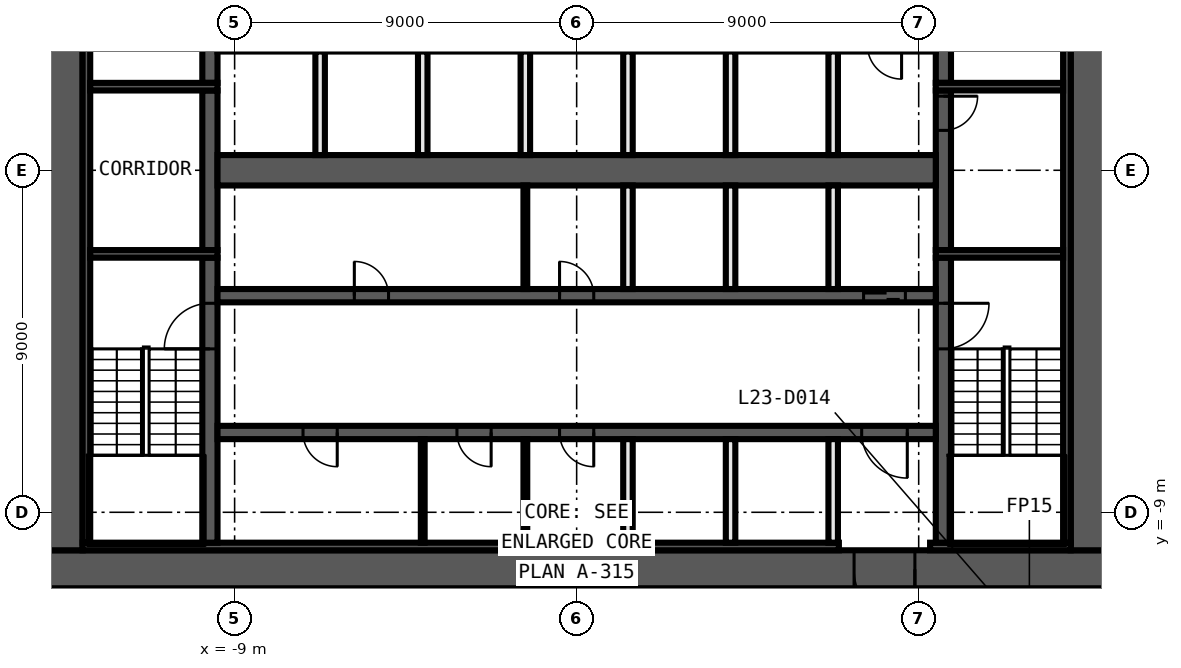
"""IFC4 building model, lengths in metres.
Left out: names, types, materials, properties, quantities, classifications, styles, units other than length and angle.
Written with IfcOpenShell. Run it as: python <this file> out.ifc"""

import sys

from ifc_helpers import new_model, si_unit, direction, frame, frame_2d, origin, place, context, subcontext, project, spatial, rectangle, extrude, element, fill, save


model = new_model("IFC4")
c1 = context("Model", 3, precision=1e-05, world=origin(), true_north=direction((0.0, 1.0)))
c2 = subcontext(c1, "Body", "Model", "MODEL_VIEW")
j1 = project(units=[si_unit("LENGTHUNIT", "METRE"), si_unit("PLANEANGLEUNIT", "RADIAN")], contexts=[c1])
p1 = place(None, origin())
s1 = spatial("IfcSite", under=j1, at=p1, CompositionType="ELEMENT")
p2 = place(p1, origin())
s2 = spatial("IfcBuilding", under=s1, at=p2, CompositionType="ELEMENT")
p3 = place(p2, frame((0.0, 0.0, 110.0)))
s3 = spatial("IfcBuildingStorey", under=s2, at=p3, CompositionType="ELEMENT", Elevation=110.0)
p4 = place(p3, frame((14.0, -10.5, 0.0), z_axis=(0.0, 0.0, 1.0), x_axis=(-1.0, 0.0, 0.0)))
e1 = element("IfcWall", 1, at=p4, inside=s3, PredefinedType="SHEAR", context=c2, shape_type="SweptSolid", body=[
    extrude(rectangle(XDim=28.0, YDim=1.0, at=frame_2d((14.0, 0.0))), origin(), (0.0, 0.0, 1.0), 3.3),
])
p5 = place(p4, frame((5.1, 0.0, 0.0)))
e2 = element("IfcOpeningElement", 2, at=p5, cuts=e1, PredefinedType="OPENING", context=c2, shape_type="SweptSolid", body=[
    extrude(rectangle(XDim=1.6, YDim=2.1, at=frame_2d((0.8, 1.05))), frame((0.0, 0.51, 0.0), z_axis=(0.0, -1.0, 0.0), x_axis=(1.0, 0.0, 0.0)), (0.0, 0.0, 1.0), 1.02),
])
for number, where, z_axis, x_axis in (
    (3, (13.5, 10.0, 0.0), (0.0, 0.0, 1.0), (0.0, -1.0, 0.0)),
    (4, (-13.5, -10.0, 0.0), (0.0, 0.0, 1.0), (0.0, 1.0, 0.0)),
):
    element("IfcWall", number, at=place(p3, frame(where, z_axis=z_axis, x_axis=x_axis)), inside=s3, PredefinedType="SHEAR", context=c2, shape_type="SweptSolid", body=[
        extrude(rectangle(XDim=20.0, YDim=1.0, at=frame_2d((10.0, 0.0))), origin(), (0.0, 0.0, 1.0), 3.3),
    ])
p6 = place(p3, frame((13.0, -9.9, 0.0), z_axis=(0.0, 0.0, 1.0), x_axis=(-1.0, 0.0, 0.0)))
e5 = element("IfcWall", 5, at=p6, inside=s3, PredefinedType="SHEAR", context=c2, shape_type="SweptSolid", body=[
    extrude(rectangle(XDim=3.7, YDim=0.2, at=frame_2d((1.85, 0.0))), origin(), (0.0, 0.0, 1.0), 3.3),
])
p7 = place(p3, frame((6.9, -9.9, 0.0), z_axis=(0.0, 0.0, 1.0), x_axis=(-1.0, 0.0, 0.0)))
e6 = element("IfcWall", 6, at=p7, inside=s3, PredefinedType="SHEAR", context=c2, shape_type="SweptSolid", body=[
    extrude(rectangle(XDim=19.9, YDim=0.2, at=frame_2d((9.95, 0.0))), origin(), (0.0, 0.0, 1.0), 3.3),
])
for number, where, z_axis, x_axis in (
    (7, (12.9, 9.8, 0.0), (0.0, 0.0, 1.0), (0.0, -1.0, 0.0)),
    (8, (-12.9, -9.8, 0.0), (0.0, 0.0, 1.0), (0.0, 1.0, 0.0)),
):
    element("IfcWall", number, at=place(p3, frame(where, z_axis=z_axis, x_axis=x_axis)), inside=s3, PredefinedType="SHEAR", context=c2, shape_type="SweptSolid", body=[
        extrude(rectangle(XDim=19.6, YDim=0.2, at=frame_2d((9.8, 0.0))), origin(), (0.0, 0.0, 1.0), 3.3),
    ])
p8 = place(p3, frame((9.65, -2.3, 0.0), z_axis=(0.0, 0.0, 1.0), x_axis=(0.0, -1.0, 0.0)))
e9 = element("IfcWall", 9, at=p8, inside=s3, PredefinedType="SHEAR", context=c2, shape_type="SweptSolid", body=[
    extrude(rectangle(XDim=7.5, YDim=0.4, at=frame_2d((3.75, 0.0))), origin(), (0.0, 0.0, 1.0), 3.3),
])
p9 = place(p8, frame((1.2, 0.0, 0.0)))
e10 = element("IfcOpeningElement", 10, at=p9, cuts=e9, PredefinedType="OPENING", context=c2, shape_type="SweptSolid", body=[
    extrude(rectangle(XDim=1.2, YDim=2.1, at=frame_2d((0.6, 1.05))), frame((0.0, 0.21, 0.0), z_axis=(0.0, -1.0, 0.0), x_axis=(1.0, 0.0, 0.0)), (0.0, 0.0, 1.0), 0.42),
])
p10 = place(p3, frame((9.65, 2.1, 0.0), z_axis=(0.0, 0.0, 1.0), x_axis=(0.0, -1.0, 0.0)))
e11 = element("IfcWall", 11, at=p10, inside=s3, PredefinedType="SHEAR", context=c2, shape_type="SweptSolid", body=[
    extrude(rectangle(XDim=4.2, YDim=0.4, at=frame_2d((2.1, 0.0))), origin(), (0.0, 0.0, 1.0), 3.3),
])
p11 = place(p10, frame((0.15, 0.0, 0.0)))
e12 = element("IfcOpeningElement", 12, at=p11, cuts=e11, PredefinedType="OPENING", context=c2, shape_type="SweptSolid", body=[
    extrude(rectangle(XDim=0.9, YDim=2.1, at=frame_2d((0.45, 1.05))), frame((0.0, 0.21, 0.0), z_axis=(0.0, -1.0, 0.0), x_axis=(1.0, 0.0, 0.0)), (0.0, 0.0, 1.0), 0.42),
])
p12 = place(p3, frame((9.65, 9.8, 0.0), z_axis=(0.0, 0.0, 1.0), x_axis=(0.0, -1.0, 0.0)))
e13 = element("IfcWall", 13, at=p12, inside=s3, PredefinedType="SHEAR", context=c2, shape_type="SweptSolid", body=[
    extrude(rectangle(XDim=7.5, YDim=0.4, at=frame_2d((3.75, 0.0))), origin(), (0.0, 0.0, 1.0), 3.3),
])
p13 = place(p12, frame((5.1, 0.0, 0.0)))
e14 = element("IfcOpeningElement", 14, at=p13, cuts=e13, PredefinedType="OPENING", context=c2, shape_type="SweptSolid", body=[
    extrude(rectangle(XDim=1.2, YDim=2.1, at=frame_2d((0.6, 1.05))), frame((0.0, 0.21, 0.0), z_axis=(0.0, -1.0, 0.0), x_axis=(1.0, 0.0, 0.0)), (0.0, 0.0, 1.0), 0.42),
])
p14 = place(p3, frame((-9.65, -9.8, 0.0), z_axis=(0.0, 0.0, 1.0), x_axis=(0.0, 1.0, 0.0)))
e15 = element("IfcWall", 15, at=p14, inside=s3, PredefinedType="SHEAR", context=c2, shape_type="SweptSolid", body=[
    extrude(rectangle(XDim=7.5, YDim=0.4, at=frame_2d((3.75, 0.0))), origin(), (0.0, 0.0, 1.0), 3.3),
])
p15 = place(p14, frame((5.1, 0.0, 0.0)))
e16 = element("IfcOpeningElement", 16, at=p15, cuts=e15, PredefinedType="OPENING", context=c2, shape_type="SweptSolid", body=[
    extrude(rectangle(XDim=1.2, YDim=2.1, at=frame_2d((0.6, 1.05))), frame((0.0, 0.21, 0.0), z_axis=(0.0, -1.0, 0.0), x_axis=(1.0, 0.0, 0.0)), (0.0, 0.0, 1.0), 0.42),
])
p16 = place(p3, frame((-9.65, -2.1, 0.0), z_axis=(0.0, 0.0, 1.0), x_axis=(0.0, 1.0, 0.0)))
e17 = element("IfcWall", 17, at=p16, inside=s3, PredefinedType="SHEAR", context=c2, shape_type="SweptSolid", body=[
    extrude(rectangle(XDim=4.2, YDim=0.4, at=frame_2d((2.1, 0.0))), origin(), (0.0, 0.0, 1.0), 3.3),
])
p17 = place(p3, frame((-9.65, 2.3, 0.0), z_axis=(0.0, 0.0, 1.0), x_axis=(0.0, 1.0, 0.0)))
e18 = element("IfcWall", 18, at=p17, inside=s3, PredefinedType="SHEAR", context=c2, shape_type="SweptSolid", body=[
    extrude(rectangle(XDim=7.5, YDim=0.4, at=frame_2d((3.75, 0.0))), origin(), (0.0, 0.0, 1.0), 3.3),
])
p18 = place(p17, frame((1.2, 0.0, 0.0)))
e19 = element("IfcOpeningElement", 19, at=p18, cuts=e18, PredefinedType="OPENING", context=c2, shape_type="SweptSolid", body=[
    extrude(rectangle(XDim=1.2, YDim=2.1, at=frame_2d((0.6, 1.05))), frame((0.0, 0.21, 0.0), z_axis=(0.0, -1.0, 0.0), x_axis=(1.0, 0.0, 0.0)), (0.0, 0.0, 1.0), 0.42),
])
for number, where, z_axis, x_axis in (
    (20, (9.45, 2.2, 0.0), (0.0, 0.0, 1.0), (1.0, 0.0, 0.0)),
    (21, (-9.45, 2.2, 0.0), (0.0, 0.0, 1.0), (-1.0, 0.0, 0.0)),
    (22, (9.45, -2.2, 0.0), (0.0, 0.0, 1.0), (1.0, 0.0, 0.0)),
    (23, (-9.45, -2.2, 0.0), (0.0, 0.0, 1.0), (-1.0, 0.0, 0.0)),
):
    element("IfcWall", number, at=place(p3, frame(where, z_axis=z_axis, x_axis=x_axis)), inside=s3, PredefinedType="SHEAR", context=c2, shape_type="SweptSolid", body=[
        extrude(rectangle(XDim=3.35, YDim=0.2, at=frame_2d((1.675, 0.0))), origin(), (0.0, 0.0, 1.0), 3.3),
    ])
p19 = place(p3, frame((-9.45, -3.3, 0.0), z_axis=(0.0, 0.0, 1.0), x_axis=(1.0, 0.0, 0.0)))
e24 = element("IfcWall", 24, at=p19, inside=s3, PredefinedType="SHEAR", context=c2, shape_type="SweptSolid", body=[
    extrude(rectangle(XDim=18.9, YDim=0.35, at=frame_2d((9.45, 0.0))), origin(), (0.0, 0.0, 1.0), 3.3),
])
p20 = place(p19, frame((17.0, 0.0, 0.0)))
e25 = element("IfcOpeningElement", 25, at=p20, cuts=e24, PredefinedType="OPENING", context=c2, shape_type="SweptSolid", body=[
    extrude(rectangle(XDim=1.1, YDim=2.1, at=frame_2d((0.55, 1.05))), frame((0.0, 0.185, 0.0), z_axis=(0.0, -1.0, 0.0), x_axis=(1.0, 0.0, 0.0)), (0.0, 0.0, 1.0), 0.37),
])
p21 = place(p19, frame((3.6, 0.0, 0.0)))
e26 = element("IfcOpeningElement", 26, at=p21, cuts=e24, PredefinedType="OPENING", context=c2, shape_type="SweptSolid", body=[
    extrude(rectangle(XDim=0.9, YDim=2.1, at=frame_2d((0.45, 1.05))), frame((0.0, 0.185, 0.0), z_axis=(0.0, -1.0, 0.0), x_axis=(1.0, 0.0, 0.0)), (0.0, 0.0, 1.0), 0.37),
])
p22 = place(p19, frame((9.0, 0.0, 0.0)))
e27 = element("IfcOpeningElement", 27, at=p22, cuts=e24, PredefinedType="OPENING", context=c2, shape_type="SweptSolid", body=[
    extrude(rectangle(XDim=0.9, YDim=2.1, at=frame_2d((0.45, 1.05))), frame((0.0, 0.185, 0.0), z_axis=(0.0, -1.0, 0.0), x_axis=(1.0, 0.0, 0.0)), (0.0, 0.0, 1.0), 0.37),
])
p23 = place(p3, frame((9.45, -6.9, 0.0), z_axis=(0.0, 0.0, 1.0), x_axis=(-1.0, 0.0, 0.0)))
e28 = element("IfcWall", 28, at=p23, inside=s3, PredefinedType="SHEAR", context=c2, shape_type="SweptSolid", body=[
    extrude(rectangle(XDim=18.9, YDim=0.35, at=frame_2d((9.45, 0.0))), origin(), (0.0, 0.0, 1.0), 3.3),
])
p24 = place(p23, frame((0.75, 0.0, 0.0)))
e29 = element("IfcOpeningElement", 29, at=p24, cuts=e28, PredefinedType="OPENING", context=c2, shape_type="SweptSolid", body=[
    extrude(rectangle(XDim=1.2, YDim=2.1, at=frame_2d((0.6, 1.05))), frame((0.0, 0.185, 0.0), z_axis=(0.0, -1.0, 0.0), x_axis=(1.0, 0.0, 0.0)), (0.0, 0.0, 1.0), 0.37),
])
p25 = place(p23, frame((15.75, 0.0, 0.0)))
e30 = element("IfcOpeningElement", 30, at=p25, cuts=e28, PredefinedType="OPENING", context=c2, shape_type="SweptSolid", body=[
    extrude(rectangle(XDim=0.9, YDim=2.1, at=frame_2d((0.45, 1.05))), frame((0.0, 0.185, 0.0), z_axis=(0.0, -1.0, 0.0), x_axis=(1.0, 0.0, 0.0)), (0.0, 0.0, 1.0), 0.37),
])
p26 = place(p23, frame((11.7, 0.0, 0.0)))
e31 = element("IfcOpeningElement", 31, at=p26, cuts=e28, PredefinedType="OPENING", context=c2, shape_type="SweptSolid", body=[
    extrude(rectangle(XDim=0.9, YDim=2.1, at=frame_2d((0.45, 1.05))), frame((0.0, 0.185, 0.0), z_axis=(0.0, -1.0, 0.0), x_axis=(1.0, 0.0, 0.0)), (0.0, 0.0, 1.0), 0.37),
])
p27 = place(p23, frame((9.0, 0.0, 0.0)))
e32 = element("IfcOpeningElement", 32, at=p27, cuts=e28, PredefinedType="OPENING", context=c2, shape_type="SweptSolid", body=[
    extrude(rectangle(XDim=0.9, YDim=2.1, at=frame_2d((0.45, 1.05))), frame((0.0, 0.185, 0.0), z_axis=(0.0, -1.0, 0.0), x_axis=(1.0, 0.0, 0.0)), (0.0, 0.0, 1.0), 0.37),
])
p28 = place(p3, frame((-9.45, 0.0, 0.0), z_axis=(0.0, 0.0, 1.0), x_axis=(1.0, 0.0, 0.0)))
e33 = element("IfcWall", 33, at=p28, inside=s3, PredefinedType="SHEAR", context=c2, shape_type="SweptSolid", body=[
    extrude(rectangle(XDim=18.9, YDim=0.8, at=frame_2d((9.45, 0.0))), origin(), (0.0, 0.0, 1.0), 3.3),
])
for number, where, z_axis, x_axis in (
    (34, (6.75, -9.8, 0.0), (0.0, 0.0, 1.0), (0.0, 1.0, 0.0)),
    (35, (6.75, -3.125, 0.0), (0.0, 0.0, 1.0), (0.0, 1.0, 0.0)),
    (36, (6.75, 0.4, 0.0), (0.0, 0.0, 1.0), (0.0, 1.0, 0.0)),
    (37, (4.05, -9.8, 0.0), (0.0, 0.0, 1.0), (0.0, 1.0, 0.0)),
    (38, (4.05, -3.125, 0.0), (0.0, 0.0, 1.0), (0.0, 1.0, 0.0)),
    (39, (4.05, 0.4, 0.0), (0.0, 0.0, 1.0), (0.0, 1.0, 0.0)),
    (40, (1.35, -9.8, 0.0), (0.0, 0.0, 1.0), (0.0, 1.0, 0.0)),
    (41, (1.35, -3.125, 0.0), (0.0, 0.0, 1.0), (0.0, 1.0, 0.0)),
    (42, (1.35, 0.4, 0.0), (0.0, 0.0, 1.0), (0.0, 1.0, 0.0)),
):
    element("IfcWall", number, at=place(p3, frame(where, z_axis=z_axis, x_axis=x_axis)), inside=s3, PredefinedType="SOLIDWALL", context=c2, shape_type="SweptSolid", body=[
        extrude(rectangle(XDim=2.725, YDim=0.25, at=frame_2d((1.363, 0.0))), origin(), (0.0, 0.0, 1.0), 3.3),
    ])
for number, where, z_axis, x_axis in (
    (43, (-1.35, -9.8, 0.0), (0.0, 0.0, 1.0), (0.0, 1.0, 0.0)),
    (44, (-1.35, -3.125, 0.0), (0.0, 0.0, 1.0), (0.0, 1.0, 0.0)),
):
    element("IfcWall", number, at=place(p3, frame(where, z_axis=z_axis, x_axis=x_axis)), inside=s3, PredefinedType="PARTITIONING", context=c2, shape_type="SweptSolid", body=[
        extrude(rectangle(XDim=2.725, YDim=0.1, at=frame_2d((1.363, 0.0))), origin(), (0.0, 0.0, 1.0), 3.3),
    ])
p29 = place(p3, frame((-1.35, 0.4, 0.0), z_axis=(0.0, 0.0, 1.0), x_axis=(0.0, 1.0, 0.0)))
e45 = element("IfcWall", 45, at=p29, inside=s3, PredefinedType="SOLIDWALL", context=c2, shape_type="SweptSolid", body=[
    extrude(rectangle(XDim=2.725, YDim=0.25, at=frame_2d((1.363, 0.0))), origin(), (0.0, 0.0, 1.0), 3.3),
])
p30 = place(p3, frame((-4.05, -9.8, 0.0), z_axis=(0.0, 0.0, 1.0), x_axis=(0.0, 1.0, 0.0)))
e46 = element("IfcWall", 46, at=p30, inside=s3, PredefinedType="PARTITIONING", context=c2, shape_type="SweptSolid", body=[
    extrude(rectangle(XDim=2.725, YDim=0.1, at=frame_2d((1.363, 0.0))), origin(), (0.0, 0.0, 1.0), 3.3),
])
for number, where, z_axis, x_axis in (
    (47, (-4.05, 0.4, 0.0), (0.0, 0.0, 1.0), (0.0, 1.0, 0.0)),
    (48, (-6.75, 0.4, 0.0), (0.0, 0.0, 1.0), (0.0, 1.0, 0.0)),
):
    element("IfcWall", number, at=place(p3, frame(where, z_axis=z_axis, x_axis=x_axis)), inside=s3, PredefinedType="SOLIDWALL", context=c2, shape_type="SweptSolid", body=[
        extrude(rectangle(XDim=2.725, YDim=0.25, at=frame_2d((1.363, 0.0))), origin(), (0.0, 0.0, 1.0), 3.3),
    ])
p31 = place(p11, origin())
e49 = element("IfcDoor", 49, at=p31, inside=s3, OperationType="SINGLE_SWING_RIGHT", PredefinedType="DOOR", context=c2, shape_type="SweptSolid", body=[
    extrude(rectangle(XDim=0.9, YDim=2.1, at=frame_2d((0.45, 1.05))), frame((0.0, 0.025, 0.0), z_axis=(0.0, -1.0, 0.0), x_axis=(1.0, 0.0, 0.0)), (0.0, 0.0, 1.0), 0.05),
])
fill(e12, e49)
p32 = place(p20, origin())
e50 = element("IfcDoor", 50, at=p32, inside=s3, OperationType="DOUBLE_DOOR_SLIDING", PredefinedType="DOOR", context=c2, shape_type="SweptSolid", body=[
    extrude(rectangle(XDim=1.1, YDim=2.1, at=frame_2d((0.55, 1.05))), frame((0.0, 0.025, 0.0), z_axis=(0.0, -1.0, 0.0), x_axis=(1.0, 0.0, 0.0)), (0.0, 0.0, 1.0), 0.05),
])
fill(e25, e50)
p33 = place(p5, origin())
e51 = element("IfcDoor", 51, at=p33, inside=s3, OperationType="DOUBLE_DOOR_SINGLE_SWING", PredefinedType="DOOR", context=c2, shape_type="SweptSolid", body=[
    extrude(rectangle(XDim=1.6, YDim=2.1, at=frame_2d((0.8, 1.05))), frame((0.0, 0.025, 0.0), z_axis=(0.0, -1.0, 0.0), x_axis=(1.0, 0.0, 0.0)), (0.0, 0.0, 1.0), 0.05),
])
fill(e2, e51)
p34 = place(p24, origin())
e52 = element("IfcDoor", 52, at=p34, inside=s3, OperationType="SINGLE_SWING_LEFT", PredefinedType="DOOR", context=c2, shape_type="SweptSolid", body=[
    extrude(rectangle(XDim=1.2, YDim=2.1, at=frame_2d((0.6, 1.05))), frame((0.0, 0.025, 0.0), z_axis=(0.0, -1.0, 0.0), x_axis=(1.0, 0.0, 0.0)), (0.0, 0.0, 1.0), 0.05),
])
fill(e29, e52)
p35 = place(p21, origin())
e53 = element("IfcDoor", 53, at=p35, inside=s3, OperationType="SINGLE_SWING_RIGHT", PredefinedType="DOOR", context=c2, shape_type="SweptSolid", body=[
    extrude(rectangle(XDim=0.9, YDim=2.1, at=frame_2d((0.45, 1.05))), frame((0.0, 0.025, 0.0), z_axis=(0.0, -1.0, 0.0), x_axis=(1.0, 0.0, 0.0)), (0.0, 0.0, 1.0), 0.05),
])
fill(e26, e53)
p36 = place(p22, origin())
e54 = element("IfcDoor", 54, at=p36, inside=s3, OperationType="SINGLE_SWING_LEFT", PredefinedType="DOOR", context=c2, shape_type="SweptSolid", body=[
    extrude(rectangle(XDim=0.9, YDim=2.1, at=frame_2d((0.45, 1.05))), frame((0.0, 0.025, 0.0), z_axis=(0.0, -1.0, 0.0), x_axis=(1.0, 0.0, 0.0)), (0.0, 0.0, 1.0), 0.05),
])
fill(e27, e54)
p37 = place(p25, origin())
e55 = element("IfcDoor", 55, at=p37, inside=s3, OperationType="SINGLE_SWING_RIGHT", PredefinedType="DOOR", context=c2, shape_type="SweptSolid", body=[
    extrude(rectangle(XDim=0.9, YDim=2.1, at=frame_2d((0.45, 1.05))), frame((0.0, 0.025, 0.0), z_axis=(0.0, -1.0, 0.0), x_axis=(1.0, 0.0, 0.0)), (0.0, 0.0, 1.0), 0.05),
])
fill(e30, e55)
p38 = place(p26, origin())
e56 = element("IfcDoor", 56, at=p38, inside=s3, OperationType="SINGLE_SWING_LEFT", PredefinedType="DOOR", context=c2, shape_type="SweptSolid", body=[
    extrude(rectangle(XDim=0.9, YDim=2.1, at=frame_2d((0.45, 1.05))), frame((0.0, 0.025, 0.0), z_axis=(0.0, -1.0, 0.0), x_axis=(1.0, 0.0, 0.0)), (0.0, 0.0, 1.0), 0.05),
])
fill(e31, e56)
p39 = place(p27, origin())
e57 = element("IfcDoor", 57, at=p39, inside=s3, OperationType="SINGLE_SWING_RIGHT", PredefinedType="DOOR", context=c2, shape_type="SweptSolid", body=[
    extrude(rectangle(XDim=0.9, YDim=2.1, at=frame_2d((0.45, 1.05))), frame((0.0, 0.025, 0.0), z_axis=(0.0, -1.0, 0.0), x_axis=(1.0, 0.0, 0.0)), (0.0, 0.0, 1.0), 0.05),
])
fill(e32, e57)
p40 = place(p9, origin())
e58 = element("IfcDoor", 58, at=p40, inside=s3, OperationType="SINGLE_SWING_RIGHT", PredefinedType="DOOR", context=c2, shape_type="SweptSolid", body=[
    extrude(rectangle(XDim=1.2, YDim=2.1, at=frame_2d((0.6, 1.05))), frame((0.0, 0.025, 0.0), z_axis=(0.0, -1.0, 0.0), x_axis=(1.0, 0.0, 0.0)), (0.0, 0.0, 1.0), 0.05),
])
fill(e10, e58)
p41 = place(p15, origin())
e59 = element("IfcDoor", 59, at=p41, inside=s3, OperationType="SINGLE_SWING_LEFT", PredefinedType="DOOR", context=c2, shape_type="SweptSolid", body=[
    extrude(rectangle(XDim=1.2, YDim=2.1, at=frame_2d((0.6, 1.05))), frame((0.0, 0.025, 0.0), z_axis=(0.0, -1.0, 0.0), x_axis=(1.0, 0.0, 0.0)), (0.0, 0.0, 1.0), 0.05),
])
fill(e16, e59)
save(model, sys.argv[1])
